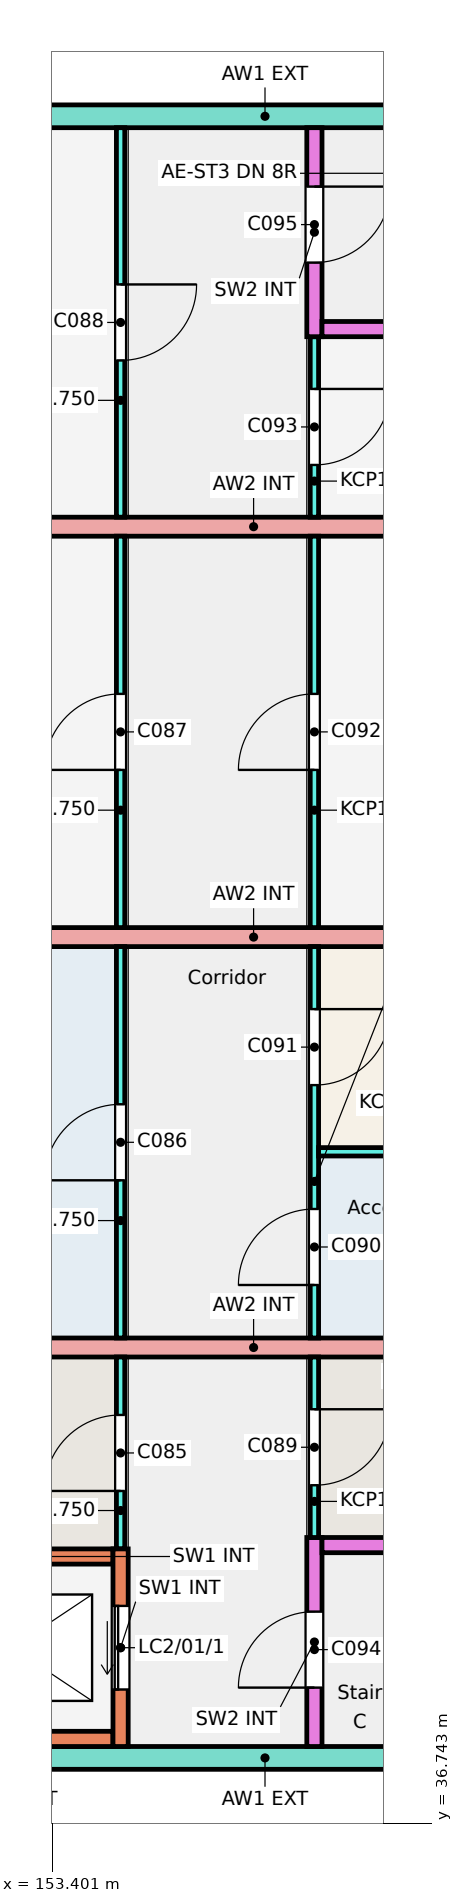
"""IFC4 building model, lengths in metres.
Left out: names, types, materials, properties, quantities, classifications, styles, units other than length and angle.
Written with IfcOpenShell. Run it as: python <this file> out.ifc"""

import sys

from ifc_helpers import new_model, si_unit, direction, frame, frame_2d, origin, place, context, subcontext, project, spatial, rectangle, extrude, element, fill, save


model = new_model("IFC4")
c1 = context("Model", 3, precision=1e-05, world=origin(), true_north=direction((0.0, 1.0)))
c2 = subcontext(c1, "Body", "Model", "MODEL_VIEW")
j1 = project(units=[si_unit("LENGTHUNIT", "METRE"), si_unit("PLANEANGLEUNIT", "RADIAN")], contexts=[c1])
p1 = place(None, origin())
s1 = spatial("IfcSite", under=j1, at=p1, CompositionType="ELEMENT")
p2 = place(p1, origin())
s2 = spatial("IfcBuilding", under=s1, at=p2, CompositionType="ELEMENT")
p3 = place(p2, frame((0.0, 0.0, 3.0)))
s3 = spatial("IfcBuildingStorey", under=s2, at=p3, CompositionType="ELEMENT", Elevation=3.0)
p4 = place(p3, frame((145.2, 37.6, 0.0), z_axis=(0.0, 0.0, 1.0), x_axis=(1.0, 0.0, 0.0)))
e1 = element("IfcWall", 1, at=p4, inside=s3, PredefinedType="SOLIDWALL", context=c2, shape_type="SweptSolid", body=[
    extrude(rectangle(XDim=22.0, YDim=0.3, at=frame_2d((11.0, 0.0))), origin(), (0.0, 0.0, 1.0), 3.0),
])
p5 = place(p4, frame((14.298, 0.0, 0.9)))
e2 = element("IfcOpeningElement", 2, at=p5, cuts=e1, PredefinedType="OPENING", context=c2, shape_type="SweptSolid", body=[
    extrude(rectangle(XDim=1.2, YDim=1.5, at=frame_2d((0.6, 0.75))), frame((0.0, 0.16, 0.0), z_axis=(0.0, -1.0, 0.0), x_axis=(1.0, 0.0, 0.0)), (0.0, 0.0, 1.0), 0.32),
])
p6 = place(p3, frame((145.2, 59.2, 0.0), z_axis=(0.0, 0.0, 1.0), x_axis=(1.0, 0.0, 0.0)))
e3 = element("IfcWall", 3, at=p6, inside=s3, PredefinedType="SOLIDWALL", context=c2, shape_type="SweptSolid", body=[
    extrude(rectangle(XDim=22.0, YDim=0.3, at=frame_2d((11.0, 0.0))), origin(), (0.0, 0.0, 1.0), 3.0),
])
p7 = place(p6, frame((14.298, 0.0, 0.9)))
e4 = element("IfcOpeningElement", 4, at=p7, cuts=e3, PredefinedType="OPENING", context=c2, shape_type="SweptSolid", body=[
    extrude(rectangle(XDim=1.2, YDim=1.5, at=frame_2d((0.6, 0.75))), frame((0.0, 0.16, 0.0), z_axis=(0.0, -1.0, 0.0), x_axis=(1.0, 0.0, 0.0)), (0.0, 0.0, 1.0), 0.32),
])
for number, where, z_axis, x_axis in (
    (5, (145.2, 43.0, 0.0), (0.0, 0.0, 1.0), (1.0, 0.0, 0.0)),
    (6, (145.2, 48.4, 0.0), (0.0, 0.0, 1.0), (1.0, 0.0, 0.0)),
    (7, (145.2, 53.8, 0.0), (0.0, 0.0, 1.0), (1.0, 0.0, 0.0)),
):
    element("IfcWall", number, at=place(p3, frame(where, z_axis=z_axis, x_axis=x_axis)), inside=s3, PredefinedType="SOLIDWALL", context=c2, shape_type="SweptSolid", body=[
        extrude(rectangle(XDim=21.7, YDim=0.25, at=frame_2d((10.85, 0.0))), origin(), (0.0, 0.0, 1.0), 3.0),
    ])
p8 = place(p3, frame((154.3, 40.35, 0.0), z_axis=(0.0, 0.0, 1.0), x_axis=(0.0, 1.0, 0.0)))
e8 = element("IfcWall", 8, at=p8, inside=s3, PredefinedType="PARTITIONING", context=c2, shape_type="SweptSolid", body=[
    extrude(rectangle(XDim=2.525, YDim=0.11, at=frame_2d((1.262, 0.0))), origin(), (0.0, 0.0, 1.0), 2.75),
])
p9 = place(p8, frame((0.762, 0.0, 0.0)))
e9 = element("IfcOpeningElement", 9, at=p9, cuts=e8, PredefinedType="OPENING", context=c2, shape_type="SweptSolid", body=[
    extrude(rectangle(XDim=1.0, YDim=2.1, at=frame_2d((0.5, 1.05))), frame((0.0, 0.065, 0.0), z_axis=(0.0, -1.0, 0.0), x_axis=(1.0, 0.0, 0.0)), (0.0, 0.0, 1.0), 0.13),
])
p10 = place(p3, frame((154.3, 43.125, 0.0), z_axis=(0.0, 0.0, 1.0), x_axis=(0.0, 1.0, 0.0)))
e10 = element("IfcWall", 10, at=p10, inside=s3, PredefinedType="PARTITIONING", context=c2, shape_type="SweptSolid", body=[
    extrude(rectangle(XDim=5.15, YDim=0.11, at=frame_2d((2.575, 0.0))), origin(), (0.0, 0.0, 1.0), 2.75),
])
p11 = place(p10, frame((2.075, 0.0, 0.0)))
e11 = element("IfcOpeningElement", 11, at=p11, cuts=e10, PredefinedType="OPENING", context=c2, shape_type="SweptSolid", body=[
    extrude(rectangle(XDim=1.0, YDim=2.1, at=frame_2d((0.5, 1.05))), frame((0.0, 0.065, 0.0), z_axis=(0.0, -1.0, 0.0), x_axis=(1.0, 0.0, 0.0)), (0.0, 0.0, 1.0), 0.13),
])
p12 = place(p3, frame((154.3, 48.525, 0.0), z_axis=(0.0, 0.0, 1.0), x_axis=(0.0, 1.0, 0.0)))
e12 = element("IfcWall", 12, at=p12, inside=s3, PredefinedType="PARTITIONING", context=c2, shape_type="SweptSolid", body=[
    extrude(rectangle(XDim=5.15, YDim=0.11, at=frame_2d((2.575, 0.0))), origin(), (0.0, 0.0, 1.0), 2.75),
])
p13 = place(p12, frame((2.075, 0.0, 0.0)))
e13 = element("IfcOpeningElement", 13, at=p13, cuts=e12, PredefinedType="OPENING", context=c2, shape_type="SweptSolid", body=[
    extrude(rectangle(XDim=1.0, YDim=2.1, at=frame_2d((0.5, 1.05))), frame((0.0, 0.065, 0.0), z_axis=(0.0, -1.0, 0.0), x_axis=(1.0, 0.0, 0.0)), (0.0, 0.0, 1.0), 0.13),
])
p14 = place(p3, frame((154.3, 53.925, 0.0), z_axis=(0.0, 0.0, 1.0), x_axis=(0.0, 1.0, 0.0)))
e14 = element("IfcWall", 14, at=p14, inside=s3, PredefinedType="PARTITIONING", context=c2, shape_type="SweptSolid", body=[
    extrude(rectangle(XDim=5.125, YDim=0.11, at=frame_2d((2.562, 0.0))), origin(), (0.0, 0.0, 1.0), 2.75),
])
p15 = place(p14, frame((2.062, 0.0, 0.0)))
e15 = element("IfcOpeningElement", 15, at=p15, cuts=e14, PredefinedType="OPENING", context=c2, shape_type="SweptSolid", body=[
    extrude(rectangle(XDim=1.0, YDim=2.1, at=frame_2d((0.5, 1.05))), frame((0.0, 0.065, 0.0), z_axis=(0.0, -1.0, 0.0), x_axis=(1.0, 0.0, 0.0)), (0.0, 0.0, 1.0), 0.13),
])
p16 = place(p3, frame((156.85, 37.75, 0.0), z_axis=(0.0, 0.0, 1.0), x_axis=(0.0, 1.0, 0.0)))
e16 = element("IfcWall", 16, at=p16, inside=s3, PredefinedType="SOLIDWALL", context=c2, shape_type="SweptSolid", body=[
    extrude(rectangle(XDim=2.75, YDim=0.2, at=frame_2d((1.375, 0.0))), origin(), (0.0, 0.0, 1.0), 2.75),
])
p17 = place(p16, frame((0.775, 0.0, 0.0)))
e17 = element("IfcOpeningElement", 17, at=p17, cuts=e16, PredefinedType="OPENING", context=c2, shape_type="SweptSolid", body=[
    extrude(rectangle(XDim=1.0, YDim=2.1, at=frame_2d((0.5, 1.05))), frame((0.0, 0.11, 0.0), z_axis=(0.0, -1.0, 0.0), x_axis=(1.0, 0.0, 0.0)), (0.0, 0.0, 1.0), 0.22),
])
p18 = place(p3, frame((156.85, 40.5, 0.0), z_axis=(0.0, 0.0, 1.0), x_axis=(0.0, 1.0, 0.0)))
e18 = element("IfcWall", 18, at=p18, inside=s3, PredefinedType="PARTITIONING", context=c2, shape_type="SweptSolid", body=[
    extrude(rectangle(XDim=2.375, YDim=0.11, at=frame_2d((1.188, 0.0))), origin(), (0.0, 0.0, 1.0), 2.75),
])
p19 = place(p18, frame((0.688, 0.0, 0.0)))
e19 = element("IfcOpeningElement", 19, at=p19, cuts=e18, PredefinedType="OPENING", context=c2, shape_type="SweptSolid", body=[
    extrude(rectangle(XDim=1.0, YDim=2.1, at=frame_2d((0.5, 1.05))), frame((0.0, 0.065, 0.0), z_axis=(0.0, -1.0, 0.0), x_axis=(1.0, 0.0, 0.0)), (0.0, 0.0, 1.0), 0.13),
])
p20 = place(p3, frame((156.85, 43.125, 0.0), z_axis=(0.0, 0.0, 1.0), x_axis=(0.0, 1.0, 0.0)))
e20 = element("IfcWall", 20, at=p20, inside=s3, PredefinedType="PARTITIONING", context=c2, shape_type="SweptSolid", body=[
    extrude(rectangle(XDim=5.15, YDim=0.11, at=frame_2d((2.575, 0.0))), origin(), (0.0, 0.0, 1.0), 2.75),
])
p21 = place(p20, frame((0.698, 0.0, 0.0)))
e21 = element("IfcOpeningElement", 21, at=p21, cuts=e20, PredefinedType="OPENING", context=c2, shape_type="SweptSolid", body=[
    extrude(rectangle(XDim=1.0, YDim=2.1, at=frame_2d((0.5, 1.05))), frame((0.0, 0.065, 0.0), z_axis=(0.0, -1.0, 0.0), x_axis=(1.0, 0.0, 0.0)), (0.0, 0.0, 1.0), 0.13),
])
p22 = place(p20, frame((3.327, 0.0, 0.0)))
e22 = element("IfcOpeningElement", 22, at=p22, cuts=e20, PredefinedType="OPENING", context=c2, shape_type="SweptSolid", body=[
    extrude(rectangle(XDim=1.0, YDim=2.1, at=frame_2d((0.5, 1.05))), frame((0.0, 0.065, 0.0), z_axis=(0.0, -1.0, 0.0), x_axis=(1.0, 0.0, 0.0)), (0.0, 0.0, 1.0), 0.13),
])
p23 = place(p3, frame((156.85, 48.525, 0.0), z_axis=(0.0, 0.0, 1.0), x_axis=(0.0, 1.0, 0.0)))
e23 = element("IfcWall", 23, at=p23, inside=s3, PredefinedType="PARTITIONING", context=c2, shape_type="SweptSolid", body=[
    extrude(rectangle(XDim=5.15, YDim=0.11, at=frame_2d((2.575, 0.0))), origin(), (0.0, 0.0, 1.0), 2.75),
])
p24 = place(p23, frame((2.075, 0.0, 0.0)))
e24 = element("IfcOpeningElement", 24, at=p24, cuts=e23, PredefinedType="OPENING", context=c2, shape_type="SweptSolid", body=[
    extrude(rectangle(XDim=1.0, YDim=2.1, at=frame_2d((0.5, 1.05))), frame((0.0, 0.065, 0.0), z_axis=(0.0, -1.0, 0.0), x_axis=(1.0, 0.0, 0.0)), (0.0, 0.0, 1.0), 0.13),
])
p25 = place(p3, frame((156.85, 53.925, 0.0), z_axis=(0.0, 0.0, 1.0), x_axis=(0.0, 1.0, 0.0)))
e25 = element("IfcWall", 25, at=p25, inside=s3, PredefinedType="PARTITIONING", context=c2, shape_type="SweptSolid", body=[
    extrude(rectangle(XDim=2.375, YDim=0.11, at=frame_2d((1.188, 0.0))), origin(), (0.0, 0.0, 1.0), 2.75),
])
p26 = place(p25, frame((0.688, 0.0, 0.0)))
e26 = element("IfcOpeningElement", 26, at=p26, cuts=e25, PredefinedType="OPENING", context=c2, shape_type="SweptSolid", body=[
    extrude(rectangle(XDim=1.0, YDim=2.1, at=frame_2d((0.5, 1.05))), frame((0.0, 0.065, 0.0), z_axis=(0.0, -1.0, 0.0), x_axis=(1.0, 0.0, 0.0)), (0.0, 0.0, 1.0), 0.13),
])
p27 = place(p3, frame((156.85, 56.3, 0.0), z_axis=(0.0, 0.0, 1.0), x_axis=(0.0, 1.0, 0.0)))
e27 = element("IfcWall", 27, at=p27, inside=s3, PredefinedType="SOLIDWALL", context=c2, shape_type="SweptSolid", body=[
    extrude(rectangle(XDim=2.75, YDim=0.2, at=frame_2d((1.375, 0.0))), origin(), (0.0, 0.0, 1.0), 2.75),
])
p28 = place(p27, frame((0.975, 0.0, 0.0)))
e28 = element("IfcOpeningElement", 28, at=p28, cuts=e27, PredefinedType="OPENING", context=c2, shape_type="SweptSolid", body=[
    extrude(rectangle(XDim=1.0, YDim=2.1, at=frame_2d((0.5, 1.05))), frame((0.0, 0.11, 0.0), z_axis=(0.0, -1.0, 0.0), x_axis=(1.0, 0.0, 0.0)), (0.0, 0.0, 1.0), 0.22),
])
for number, where, z_axis, x_axis in (
    (29, (156.95, 40.4, 0.0), (0.0, 0.0, 1.0), (1.0, 0.0, 0.0)),
    (30, (156.95, 56.4, 0.0), (0.0, 0.0, 1.0), (1.0, 0.0, 0.0)),
):
    element("IfcWall", number, at=place(p3, frame(where, z_axis=z_axis, x_axis=x_axis)), inside=s3, PredefinedType="SOLIDWALL", context=c2, shape_type="SweptSolid", body=[
        extrude(rectangle(XDim=4.84, YDim=0.2, at=frame_2d((2.42, 0.0))), origin(), (0.0, 0.0, 1.0), 2.75),
    ])
p29 = place(p3, frame((156.905, 45.575, 0.0), z_axis=(0.0, 0.0, 1.0), x_axis=(1.0, 0.0, 0.0)))
e31 = element("IfcWall", 31, at=p29, inside=s3, PredefinedType="PARTITIONING", context=c2, shape_type="SweptSolid", body=[
    extrude(rectangle(XDim=2.85, YDim=0.11, at=frame_2d((1.425, 0.0))), origin(), (0.0, 0.0, 1.0), 2.75),
])
for number, where, z_axis, x_axis in (
    (32, (151.65, 40.25, 0.0), (0.0, 0.0, 1.0), (1.0, 0.0, 0.0)),
    (33, (151.65, 37.85, 0.0), (0.0, 0.0, 1.0), (1.0, 0.0, 0.0)),
):
    element("IfcWall", number, at=place(p3, frame(where, z_axis=z_axis, x_axis=x_axis)), inside=s3, PredefinedType="SOLIDWALL", context=c2, shape_type="SweptSolid", body=[
        extrude(rectangle(XDim=2.55, YDim=0.2, at=frame_2d((1.275, 0.0))), origin(), (0.0, 0.0, 1.0), 3.0),
    ])
p30 = place(p3, frame((154.3, 37.75, 0.0), z_axis=(0.0, 0.0, 1.0), x_axis=(0.0, 1.0, 0.0)))
e34 = element("IfcWall", 34, at=p30, inside=s3, PredefinedType="SOLIDWALL", context=c2, shape_type="SweptSolid", body=[
    extrude(rectangle(XDim=2.6, YDim=0.2, at=frame_2d((1.3, 0.0))), origin(), (0.0, 0.0, 1.0), 3.0),
])
p31 = place(p30, frame((0.75, 0.0, 0.0)))
e35 = element("IfcOpeningElement", 35, at=p31, cuts=e34, PredefinedType="OPENING", context=c2, shape_type="SweptSolid", body=[
    extrude(rectangle(XDim=1.1, YDim=2.1, at=frame_2d((0.55, 1.05))), frame((0.0, 0.11, 0.0), z_axis=(0.0, -1.0, 0.0), x_axis=(1.0, 0.0, 0.0)), (0.0, 0.0, 1.0), 0.22),
])
p32 = place(p9, origin())
e36 = element("IfcDoor", 36, at=p32, inside=s3, OperationType="SINGLE_SWING_LEFT", PredefinedType="DOOR", context=c2, shape_type="SweptSolid", body=[
    extrude(rectangle(XDim=1.0, YDim=2.1, at=frame_2d((0.5, 1.05))), frame((0.0, 0.025, 0.0), z_axis=(0.0, -1.0, 0.0), x_axis=(1.0, 0.0, 0.0)), (0.0, 0.0, 1.0), 0.05),
])
fill(e9, e36)
p33 = place(p11, origin())
e37 = element("IfcDoor", 37, at=p33, inside=s3, OperationType="SINGLE_SWING_LEFT", PredefinedType="DOOR", context=c2, shape_type="SweptSolid", body=[
    extrude(rectangle(XDim=1.0, YDim=2.1, at=frame_2d((0.5, 1.05))), frame((0.0, 0.025, 0.0), z_axis=(0.0, -1.0, 0.0), x_axis=(1.0, 0.0, 0.0)), (0.0, 0.0, 1.0), 0.05),
])
fill(e11, e37)
p34 = place(p13, origin())
e38 = element("IfcDoor", 38, at=p34, inside=s3, OperationType="SINGLE_SWING_LEFT", PredefinedType="DOOR", context=c2, shape_type="SweptSolid", body=[
    extrude(rectangle(XDim=1.0, YDim=2.1, at=frame_2d((0.5, 1.05))), frame((0.0, 0.025, 0.0), z_axis=(0.0, -1.0, 0.0), x_axis=(1.0, 0.0, 0.0)), (0.0, 0.0, 1.0), 0.05),
])
fill(e13, e38)
p35 = place(p15, origin())
e39 = element("IfcDoor", 39, at=p35, inside=s3, OperationType="SINGLE_SWING_RIGHT", PredefinedType="DOOR", context=c2, shape_type="SweptSolid", body=[
    extrude(rectangle(XDim=1.0, YDim=2.1, at=frame_2d((0.5, 1.05))), frame((0.0, 0.025, 0.0), z_axis=(0.0, -1.0, 0.0), x_axis=(1.0, 0.0, 0.0)), (0.0, 0.0, 1.0), 0.05),
])
fill(e15, e39)
p36 = place(p19, origin())
e40 = element("IfcDoor", 40, at=p36, inside=s3, OperationType="SINGLE_SWING_RIGHT", PredefinedType="DOOR", context=c2, shape_type="SweptSolid", body=[
    extrude(rectangle(XDim=1.0, YDim=2.1, at=frame_2d((0.5, 1.05))), frame((0.0, 0.025, 0.0), z_axis=(0.0, -1.0, 0.0), x_axis=(1.0, 0.0, 0.0)), (0.0, 0.0, 1.0), 0.05),
])
fill(e19, e40)
p37 = place(p21, origin())
e41 = element("IfcDoor", 41, at=p37, inside=s3, OperationType="SINGLE_SWING_LEFT", PredefinedType="DOOR", context=c2, shape_type="SweptSolid", body=[
    extrude(rectangle(XDim=1.0, YDim=2.1, at=frame_2d((0.5, 1.05))), frame((0.0, 0.025, 0.0), z_axis=(0.0, -1.0, 0.0), x_axis=(1.0, 0.0, 0.0)), (0.0, 0.0, 1.0), 0.05),
])
fill(e21, e41)
p38 = place(p22, origin())
e42 = element("IfcDoor", 42, at=p38, inside=s3, OperationType="SINGLE_SWING_RIGHT", PredefinedType="DOOR", context=c2, shape_type="SweptSolid", body=[
    extrude(rectangle(XDim=1.0, YDim=2.1, at=frame_2d((0.5, 1.05))), frame((0.0, 0.025, 0.0), z_axis=(0.0, -1.0, 0.0), x_axis=(1.0, 0.0, 0.0)), (0.0, 0.0, 1.0), 0.05),
])
fill(e22, e42)
p39 = place(p24, origin())
e43 = element("IfcDoor", 43, at=p39, inside=s3, OperationType="SINGLE_SWING_LEFT", PredefinedType="DOOR", context=c2, shape_type="SweptSolid", body=[
    extrude(rectangle(XDim=1.0, YDim=2.1, at=frame_2d((0.5, 1.05))), frame((0.0, 0.025, 0.0), z_axis=(0.0, -1.0, 0.0), x_axis=(1.0, 0.0, 0.0)), (0.0, 0.0, 1.0), 0.05),
])
fill(e24, e43)
p40 = place(p26, origin())
e44 = element("IfcDoor", 44, at=p40, inside=s3, OperationType="SINGLE_SWING_RIGHT", PredefinedType="DOOR", context=c2, shape_type="SweptSolid", body=[
    extrude(rectangle(XDim=1.0, YDim=2.1, at=frame_2d((0.5, 1.05))), frame((0.0, 0.025, 0.0), z_axis=(0.0, -1.0, 0.0), x_axis=(1.0, 0.0, 0.0)), (0.0, 0.0, 1.0), 0.05),
])
fill(e26, e44)
p41 = place(p17, origin())
e45 = element("IfcDoor", 45, at=p41, inside=s3, OperationType="SINGLE_SWING_LEFT", PredefinedType="DOOR", context=c2, shape_type="SweptSolid", body=[
    extrude(rectangle(XDim=1.0, YDim=2.1, at=frame_2d((0.5, 1.05))), frame((0.0, 0.025, 0.0), z_axis=(0.0, -1.0, 0.0), x_axis=(1.0, 0.0, 0.0)), (0.0, 0.0, 1.0), 0.05),
])
fill(e17, e45)
p42 = place(p28, origin())
e46 = element("IfcDoor", 46, at=p42, inside=s3, OperationType="SINGLE_SWING_RIGHT", PredefinedType="DOOR", context=c2, shape_type="SweptSolid", body=[
    extrude(rectangle(XDim=1.0, YDim=2.1, at=frame_2d((0.5, 1.05))), frame((0.0, 0.025, 0.0), z_axis=(0.0, -1.0, 0.0), x_axis=(1.0, 0.0, 0.0)), (0.0, 0.0, 1.0), 0.05),
])
fill(e28, e46)
p43 = place(p31, origin())
e47 = element("IfcDoor", 47, at=p43, inside=s3, OperationType="SLIDING_TO_LEFT", PredefinedType="DOOR", context=c2, shape_type="SweptSolid", body=[
    extrude(rectangle(XDim=1.1, YDim=2.1, at=frame_2d((0.55, 1.05))), frame((0.0, 0.025, 0.0), z_axis=(0.0, -1.0, 0.0), x_axis=(1.0, 0.0, 0.0)), (0.0, 0.0, 1.0), 0.05),
])
fill(e35, e47)
save(model, sys.argv[1])
